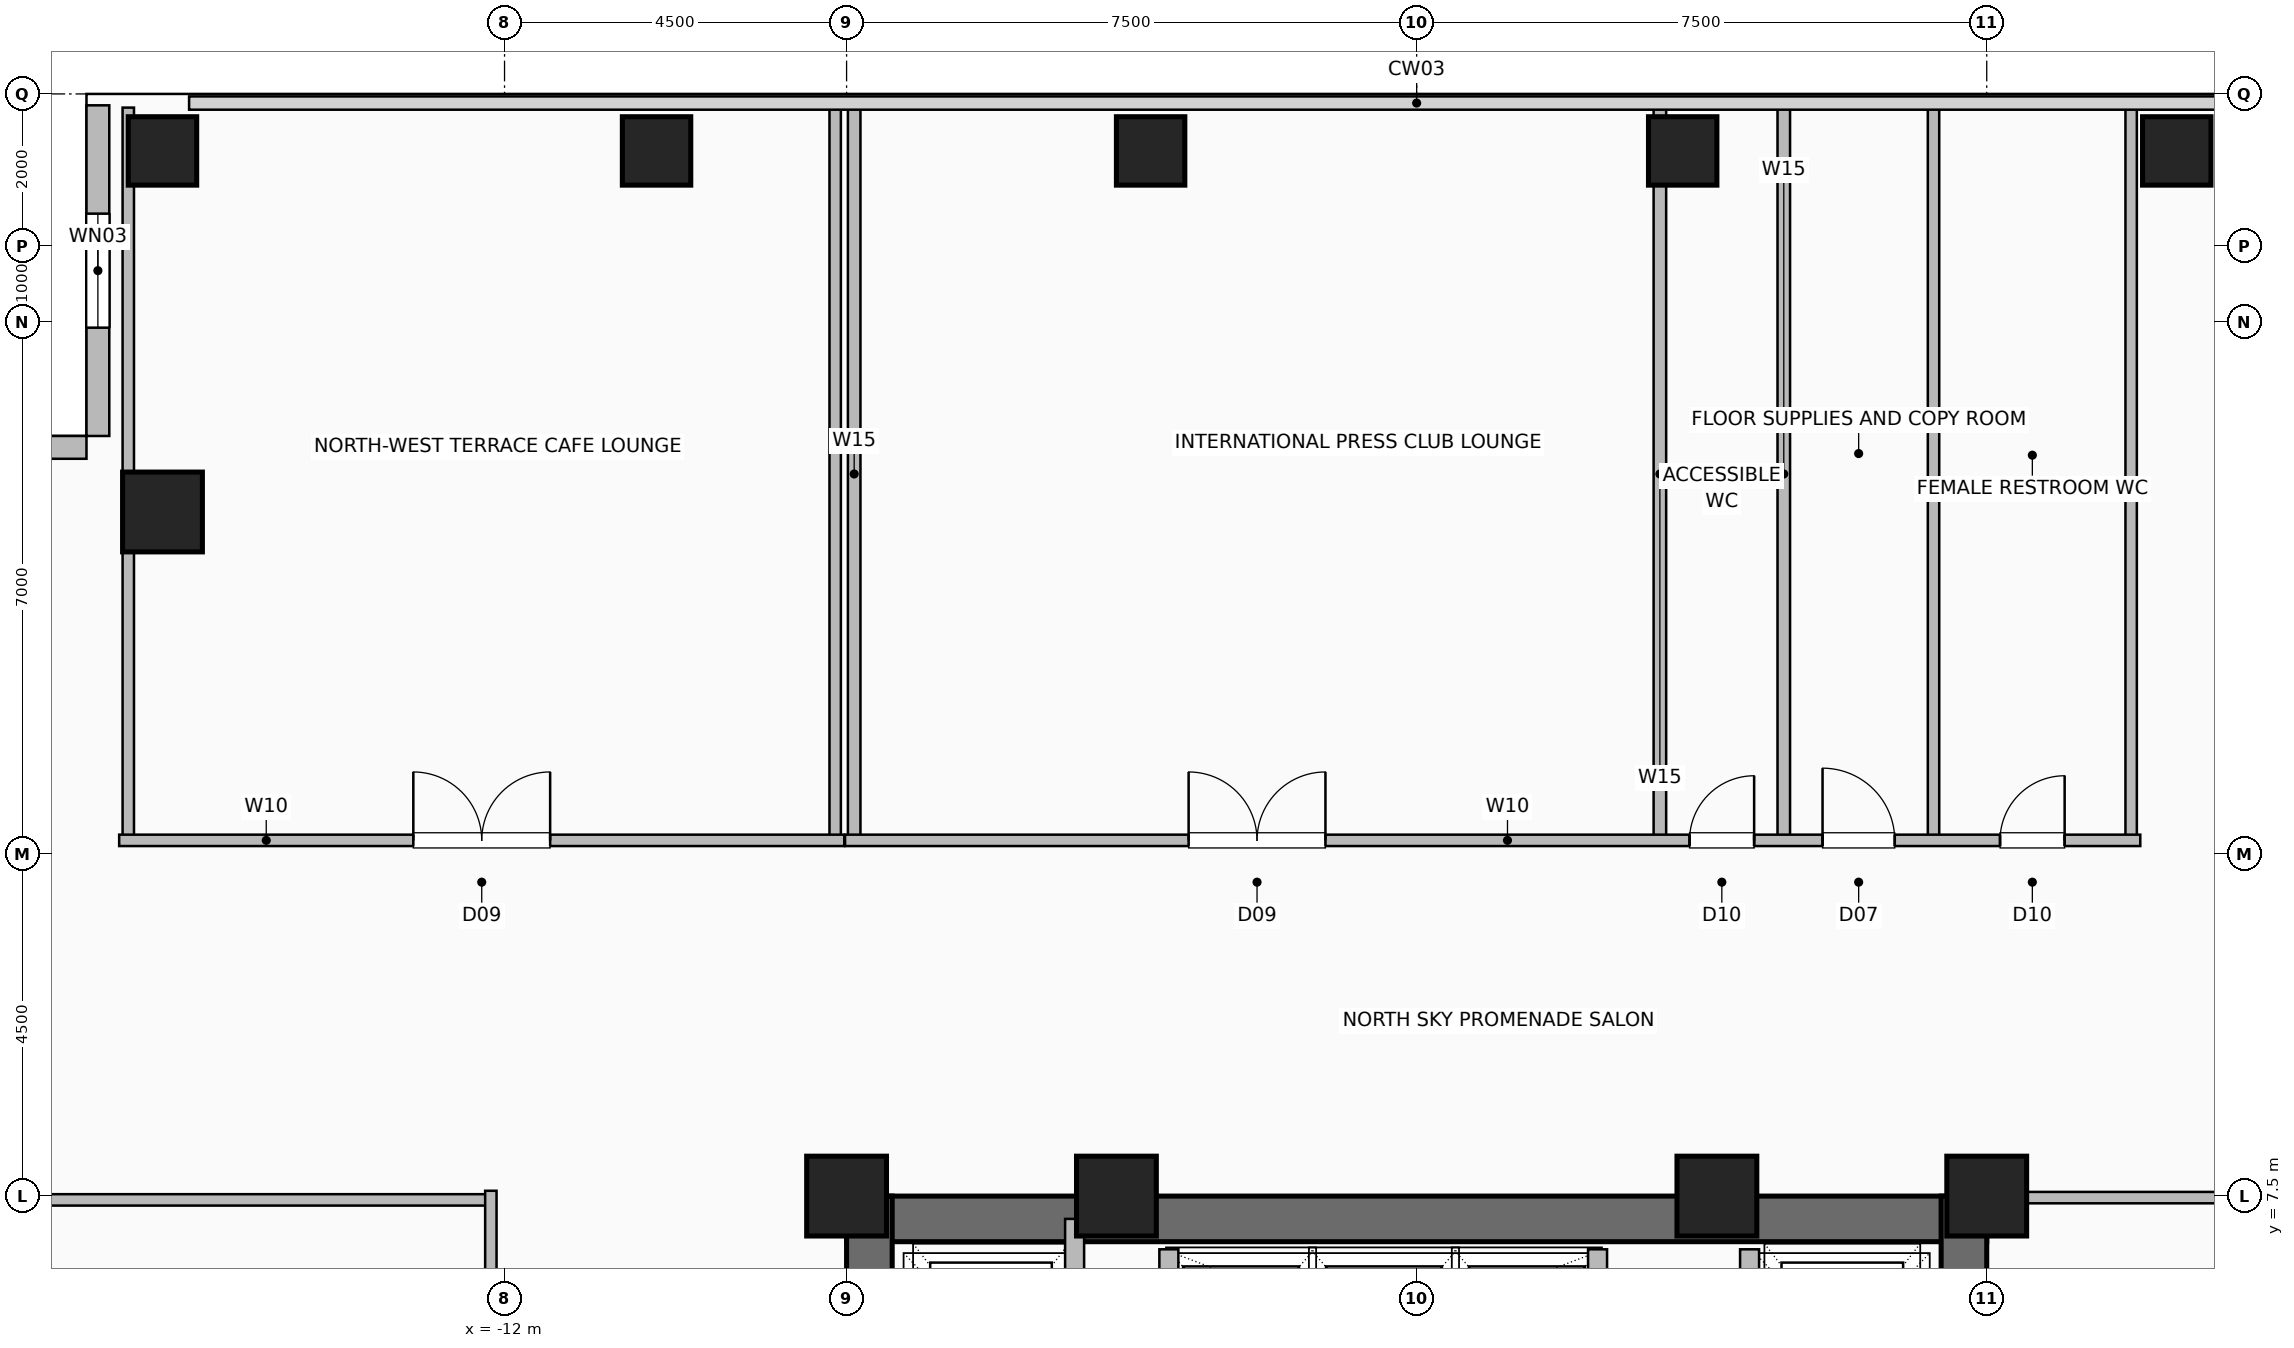
"""IFC4 building model, lengths in metres.
Left out: names, types, materials, properties, quantities, classifications, styles, units other than length and angle.
Written with IfcOpenShell. Run it as: python <this file> out.ifc"""

import sys

from ifc_helpers import new_model, si_unit, direction, frame, frame_2d, origin, origin_2d, place, context, subcontext, project, spatial, rectangle, hollow_rectangle, extrude, element, fill, save


model = new_model("IFC4")
c1 = context("Model", 3, precision=1e-05, world=origin(), true_north=direction((0.0, 1.0)))
c2 = subcontext(c1, "Body", "Model", "MODEL_VIEW")
j1 = project(units=[si_unit("LENGTHUNIT", "METRE"), si_unit("PLANEANGLEUNIT", "RADIAN")], contexts=[c1])
p1 = place(None, origin())
s1 = spatial("IfcSite", under=j1, at=p1, CompositionType="ELEMENT")
p2 = place(p1, origin())
s2 = spatial("IfcBuilding", under=s1, at=p2, CompositionType="ELEMENT")
p3 = place(p2, frame((0.0, 0.0, 119.2)))
s3 = spatial("IfcBuildingStorey", under=s2, at=p3, CompositionType="ELEMENT", Elevation=119.2)
for number, where, z_axis, x_axis in (
    (1, (7.5, 7.5, 0.0), (0.0, 0.0, 1.0), (1.0, 0.0, 0.0)),
    (2, (3.95, 7.5, 0.0), (0.0, 0.0, 1.0), (1.0, 0.0, 0.0)),
    (3, (-3.95, 7.5, 0.0), (0.0, 0.0, 1.0), (1.0, 0.0, 0.0)),
    (4, (-7.5, 7.5, 0.0), (0.0, 0.0, 1.0), (1.0, 0.0, 0.0)),
):
    element("IfcColumn", number, at=place(p3, frame(where, z_axis=z_axis, x_axis=x_axis)), inside=s3, PredefinedType="COLUMN", context=c2, shape_type="SweptSolid", body=[
        extrude(hollow_rectangle(XDim=1.05, YDim=1.05, WallThickness=0.05, at=origin_2d()), origin(), (0.0, 0.0, 1.0), 3.6),
    ])
for number, where, z_axis, x_axis in (
    (5, (-16.5, 21.25, 0.0), (0.0, 0.0, 1.0), (1.0, 0.0, 0.0)),
    (6, (-10.0, 21.25, 0.0), (0.0, 0.0, 1.0), (1.0, 0.0, 0.0)),
    (7, (-3.5, 21.25, 0.0), (0.0, 0.0, 1.0), (1.0, 0.0, 0.0)),
    (8, (3.5, 21.25, 0.0), (0.0, 0.0, 1.0), (1.0, 0.0, 0.0)),
    (9, (10.0, 21.25, 0.0), (0.0, 0.0, 1.0), (1.0, 0.0, 0.0)),
):
    element("IfcColumn", number, at=place(p3, frame(where, z_axis=z_axis, x_axis=x_axis)), inside=s3, PredefinedType="COLUMN", context=c2, shape_type="SweptSolid", body=[
        extrude(hollow_rectangle(XDim=0.9, YDim=0.9, WallThickness=0.045, at=origin_2d()), origin(), (0.0, 0.0, 1.0), 3.6),
    ])
p4 = place(p3, frame((-16.5, 16.5, 0.0), z_axis=(0.0, 0.0, 1.0), x_axis=(1.0, 0.0, 0.0)))
e10 = element("IfcColumn", 10, at=p4, inside=s3, PredefinedType="COLUMN", context=c2, shape_type="SweptSolid", body=[
    extrude(hollow_rectangle(XDim=1.05, YDim=1.05, WallThickness=0.05, at=origin_2d()), origin(), (0.0, 0.0, 1.0), 3.6),
])
p5 = place(p3, frame((-17.35, 21.85, 0.0), z_axis=(0.0, 0.0, 1.0), x_axis=(0.0, -1.0, 0.0)))
e11 = element("IfcWall", 11, at=p5, inside=s3, PredefinedType="SOLIDWALL", context=c2, shape_type="SweptSolid", body=[
    extrude(rectangle(XDim=4.35, YDim=0.3, at=frame_2d((2.175, 0.0))), origin(), (0.0, 0.0, 1.0), 3.36),
])
p6 = place(p5, frame((1.425, 0.0, 0.9)))
e12 = element("IfcOpeningElement", 12, at=p6, cuts=e11, PredefinedType="OPENING", context=c2, shape_type="SweptSolid", body=[
    extrude(rectangle(XDim=1.5, YDim=1.8, at=frame_2d((0.75, 0.9))), frame((0.0, 0.16, 0.0), z_axis=(0.0, -1.0, 0.0), x_axis=(1.0, 0.0, 0.0)), (0.0, 0.0, 1.0), 0.32),
])
p7 = place(p3, frame((-21.85, 17.35, 0.0), z_axis=(0.0, 0.0, 1.0), x_axis=(1.0, 0.0, 0.0)))
e13 = element("IfcWall", 13, at=p7, inside=s3, PredefinedType="SOLIDWALL", context=c2, shape_type="SweptSolid", body=[
    extrude(rectangle(XDim=4.35, YDim=0.3, at=frame_2d((2.175, 0.0))), origin(), (0.0, 0.0, 1.0), 3.36),
])
p8 = place(p3, frame((-7.5, 7.2, 0.0), z_axis=(0.0, 0.0, 1.0), x_axis=(1.0, 0.0, 0.0)))
e14 = element("IfcWall", 14, at=p8, inside=s3, PredefinedType="SHEAR", context=c2, shape_type="SweptSolid", body=[
    extrude(rectangle(XDim=15.0, YDim=0.6, at=frame_2d((7.5, 0.0))), origin(), (0.0, 0.0, 1.0), 3.36),
])
p9 = place(p3, frame((-7.2, -7.5, 0.0), z_axis=(0.0, 0.0, 1.0), x_axis=(0.0, 1.0, 0.0)))
e15 = element("IfcWall", 15, at=p9, inside=s3, PredefinedType="SHEAR", context=c2, shape_type="SweptSolid", body=[
    extrude(rectangle(XDim=15.0, YDim=0.6, at=frame_2d((7.5, 0.0))), origin(), (0.0, 0.0, 1.0), 3.36),
])
p10 = place(p9, frame((9.5, 0.0, 0.0)))
e16 = element("IfcOpeningElement", 16, at=p10, cuts=e15, PredefinedType="OPENING", context=c2, shape_type="SweptSolid", body=[
    extrude(rectangle(XDim=1.0, YDim=2.08, at=frame_2d((0.5, 1.04))), frame((0.0, 0.31, 0.0), z_axis=(0.0, -1.0, 0.0), x_axis=(1.0, 0.0, 0.0)), (0.0, 0.0, 1.0), 0.62),
])
p11 = place(p3, frame((7.2, -7.5, 0.0), z_axis=(0.0, 0.0, 1.0), x_axis=(0.0, 1.0, 0.0)))
e17 = element("IfcWall", 17, at=p11, inside=s3, PredefinedType="SHEAR", context=c2, shape_type="SweptSolid", body=[
    extrude(rectangle(XDim=15.0, YDim=0.6, at=frame_2d((7.5, 0.0))), origin(), (0.0, 0.0, 1.0), 3.36),
])
for number, where, z_axis, x_axis in (
    (18, (-3.26, 4.58, 0.0), (0.0, 0.0, 1.0), (0.0, 1.0, 0.0)),
    (19, (2.38, 4.58, 0.0), (0.0, 0.0, 1.0), (0.0, 1.0, 0.0)),
):
    element("IfcWall", number, at=place(p3, frame(where, z_axis=z_axis, x_axis=x_axis)), inside=s3, PredefinedType="SHEAR", context=c2, shape_type="SweptSolid", body=[
        extrude(rectangle(XDim=2.22, YDim=0.25, at=frame_2d((1.11, 0.0))), origin(), (0.0, 0.0, 1.0), 3.36),
    ])
p12 = place(p3, frame((-4.5, 4.35, 0.0), z_axis=(0.0, 0.0, 1.0), x_axis=(0.0, 1.0, 0.0)))
e20 = element("IfcWall", 20, at=p12, inside=s3, PredefinedType="SHEAR", context=c2, shape_type="SweptSolid", body=[
    extrude(rectangle(XDim=2.85, YDim=0.25, at=frame_2d((1.425, 0.0))), origin(), (0.0, 0.0, 1.0), 3.36),
])
p13 = place(p3, frame((4.38, 4.3, 0.0), z_axis=(0.0, 0.0, 1.0), x_axis=(0.0, 1.0, 0.0)))
e21 = element("IfcWall", 21, at=p13, inside=s3, PredefinedType="SHEAR", context=c2, shape_type="SweptSolid", body=[
    extrude(rectangle(XDim=2.5, YDim=0.25, at=frame_2d((1.25, 0.0))), origin(), (0.0, 0.0, 1.0), 3.36),
])
p14 = place(p13, frame((0.8, 0.0, 0.0)))
e22 = element("IfcOpeningElement", 22, at=p14, cuts=e21, PredefinedType="OPENING", context=c2, shape_type="SweptSolid", body=[
    extrude(rectangle(XDim=1.2, YDim=2.2, at=frame_2d((0.6, 1.1))), frame((0.0, 0.135, 0.0), z_axis=(0.0, -1.0, 0.0), x_axis=(1.0, 0.0, 0.0)), (0.0, 0.0, 1.0), 0.27),
])
p15 = place(p3, frame((-21.82, 7.45, 0.0), z_axis=(0.0, 0.0, 1.0), x_axis=(1.0, 0.0, 0.0)))
e23 = element("IfcWall", 23, at=p15, inside=s3, PredefinedType="PARTITIONING", context=c2, shape_type="SweptSolid", body=[
    extrude(rectangle(XDim=9.64, YDim=0.15, at=frame_2d((4.82, 0.0))), origin(), (0.0, 0.0, 1.0), 3.36),
])
p16 = place(p3, frame((-12.18, -7.57, 0.0), z_axis=(0.0, 0.0, 1.0), x_axis=(0.0, 1.0, 0.0)))
e24 = element("IfcWall", 24, at=p16, inside=s3, PredefinedType="PARTITIONING", context=c2, shape_type="SweptSolid", body=[
    extrude(rectangle(XDim=15.14, YDim=0.15, at=frame_2d((7.57, 0.0))), origin(), (0.0, 0.0, 1.0), 3.36),
])
p17 = place(p16, frame((3.695, 0.0, 0.0)))
e25 = element("IfcOpeningElement", 25, at=p17, cuts=e24, PredefinedType="OPENING", context=c2, shape_type="SweptSolid", body=[
    extrude(rectangle(XDim=1.8, YDim=2.08, at=frame_2d((0.9, 1.04))), frame((0.0, 0.085, 0.0), z_axis=(0.0, -1.0, 0.0), x_axis=(1.0, 0.0, 0.0)), (0.0, 0.0, 1.0), 0.17),
])
p18 = place(p16, frame((11.57, 0.0, 0.0)))
e26 = element("IfcOpeningElement", 26, at=p18, cuts=e24, PredefinedType="OPENING", context=c2, shape_type="SweptSolid", body=[
    extrude(rectangle(XDim=0.95, YDim=2.06, at=frame_2d((0.475, 1.03))), frame((0.0, 0.085, 0.0), z_axis=(0.0, -1.0, 0.0), x_axis=(1.0, 0.0, 0.0)), (0.0, 0.0, 1.0), 0.17),
])
for number, where, z_axis, x_axis in (
    (27, (-16.95, 12.18, 0.0), (0.0, 0.0, 1.0), (0.0, 1.0, 0.0)),
    (28, (-7.65, 12.18, 0.0), (0.0, 0.0, 1.0), (0.0, 1.0, 0.0)),
):
    element("IfcWall", number, at=place(p3, frame(where, z_axis=z_axis, x_axis=x_axis)), inside=s3, PredefinedType="PARTITIONING", context=c2, shape_type="SweptSolid", body=[
        extrude(rectangle(XDim=9.64, YDim=0.15, at=frame_2d((4.82, 0.0))), origin(), (0.0, 0.0, 1.0), 3.36),
    ])
p19 = place(p3, frame((-17.07, 12.18, 0.0), z_axis=(0.0, 0.0, 1.0), x_axis=(1.0, 0.0, 0.0)))
e29 = element("IfcWall", 29, at=p19, inside=s3, PredefinedType="PARTITIONING", context=c2, shape_type="SweptSolid", body=[
    extrude(rectangle(XDim=9.54, YDim=0.15, at=frame_2d((4.77, 0.0))), origin(), (0.0, 0.0, 1.0), 3.36),
])
p20 = place(p19, frame((3.87, 0.0, 0.0)))
e30 = element("IfcOpeningElement", 30, at=p20, cuts=e29, PredefinedType="OPENING", context=c2, shape_type="SweptSolid", body=[
    extrude(rectangle(XDim=1.8, YDim=2.08, at=frame_2d((0.9, 1.04))), frame((0.0, 0.085, 0.0), z_axis=(0.0, -1.0, 0.0), x_axis=(1.0, 0.0, 0.0)), (0.0, 0.0, 1.0), 0.17),
])
for number, where, z_axis, x_axis in (
    (31, (4.83, 12.18, 0.0), (0.0, 0.0, 1.0), (0.0, 1.0, 0.0)),
    (32, (-7.4, 12.18, 0.0), (0.0, 0.0, 1.0), (0.0, 1.0, 0.0)),
    (33, (3.2, 12.18, 0.0), (0.0, 0.0, 1.0), (0.0, 1.0, 0.0)),
):
    element("IfcWall", number, at=place(p3, frame(where, z_axis=z_axis, x_axis=x_axis)), inside=s3, PredefinedType="PLUMBINGWALL", context=c2, shape_type="SweptSolid", body=[
        extrude(rectangle(XDim=9.64, YDim=0.165, at=frame_2d((4.82, 0.0))), origin(), (0.0, 0.0, 1.0), 3.36),
    ])
for number, where, z_axis, x_axis in (
    (34, (6.8, 12.18, 0.0), (0.0, 0.0, 1.0), (0.0, 1.0, 0.0)),
    (35, (9.4, 12.18, 0.0), (0.0, 0.0, 1.0), (0.0, 1.0, 0.0)),
):
    element("IfcWall", number, at=place(p3, frame(where, z_axis=z_axis, x_axis=x_axis)), inside=s3, PredefinedType="PARTITIONING", context=c2, shape_type="SweptSolid", body=[
        extrude(rectangle(XDim=9.64, YDim=0.15, at=frame_2d((4.82, 0.0))), origin(), (0.0, 0.0, 1.0), 3.36),
    ])
p21 = place(p3, frame((-7.52, 12.18, 0.0), z_axis=(0.0, 0.0, 1.0), x_axis=(1.0, 0.0, 0.0)))
e36 = element("IfcWall", 36, at=p21, inside=s3, PredefinedType="PARTITIONING", context=c2, shape_type="SweptSolid", body=[
    extrude(rectangle(XDim=17.04, YDim=0.15, at=frame_2d((8.52, 0.0))), origin(), (0.0, 0.0, 1.0), 3.36),
])
p22 = place(p21, frame((4.52, 0.0, 0.0)))
e37 = element("IfcOpeningElement", 37, at=p22, cuts=e36, PredefinedType="OPENING", context=c2, shape_type="SweptSolid", body=[
    extrude(rectangle(XDim=1.8, YDim=2.08, at=frame_2d((0.9, 1.04))), frame((0.0, 0.085, 0.0), z_axis=(0.0, -1.0, 0.0), x_axis=(1.0, 0.0, 0.0)), (0.0, 0.0, 1.0), 0.17),
])
p23 = place(p21, frame((11.11, 0.0, 0.0)))
e38 = element("IfcOpeningElement", 38, at=p23, cuts=e36, PredefinedType="OPENING", context=c2, shape_type="SweptSolid", body=[
    extrude(rectangle(XDim=0.85, YDim=2.05, at=frame_2d((0.425, 1.025))), frame((0.0, 0.085, 0.0), z_axis=(0.0, -1.0, 0.0), x_axis=(1.0, 0.0, 0.0)), (0.0, 0.0, 1.0), 0.17),
])
p24 = place(p21, frame((12.86, 0.0, 0.0)))
e39 = element("IfcOpeningElement", 39, at=p24, cuts=e36, PredefinedType="OPENING", context=c2, shape_type="SweptSolid", body=[
    extrude(rectangle(XDim=0.95, YDim=2.06, at=frame_2d((0.475, 1.03))), frame((0.0, 0.085, 0.0), z_axis=(0.0, -1.0, 0.0), x_axis=(1.0, 0.0, 0.0)), (0.0, 0.0, 1.0), 0.17),
])
p25 = place(p21, frame((15.195, 0.0, 0.0)))
e40 = element("IfcOpeningElement", 40, at=p25, cuts=e36, PredefinedType="OPENING", context=c2, shape_type="SweptSolid", body=[
    extrude(rectangle(XDim=0.85, YDim=2.05, at=frame_2d((0.425, 1.025))), frame((0.0, 0.085, 0.0), z_axis=(0.0, -1.0, 0.0), x_axis=(1.0, 0.0, 0.0)), (0.0, 0.0, 1.0), 0.17),
])
p26 = place(p3, frame((7.6, 7.48, 0.0), z_axis=(0.0, 0.0, 1.0), x_axis=(1.0, 0.0, 0.0)))
e41 = element("IfcWall", 41, at=p26, inside=s3, PredefinedType="PARTITIONING", context=c2, shape_type="SweptSolid", body=[
    extrude(rectangle(XDim=14.22, YDim=0.15, at=frame_2d((7.11, 0.0))), origin(), (0.0, 0.0, 1.0), 3.36),
])
p27 = place(p6, origin())
e42 = element("IfcWindow", 42, at=p27, inside=s3, PartitioningType="SINGLE_PANEL", PredefinedType="WINDOW", context=c2, shape_type="SweptSolid", body=[
    extrude(rectangle(XDim=1.5, YDim=1.8, at=frame_2d((0.75, 0.9))), frame((0.0, 0.03, 0.0), z_axis=(0.0, -1.0, 0.0), x_axis=(1.0, 0.0, 0.0)), (0.0, 0.0, 1.0), 0.06),
])
fill(e12, e42)
p28 = place(p20, origin())
e43 = element("IfcDoor", 43, at=p28, inside=s3, OperationType="DOUBLE_DOOR_SINGLE_SWING", PredefinedType="DOOR", context=c2, shape_type="SweptSolid", body=[
    extrude(rectangle(XDim=1.8, YDim=2.08, at=frame_2d((0.9, 1.04))), frame((0.0, 0.025, 0.0), z_axis=(0.0, -1.0, 0.0), x_axis=(1.0, 0.0, 0.0)), (0.0, 0.0, 1.0), 0.05),
])
fill(e30, e43)
p29 = place(p22, origin())
e44 = element("IfcDoor", 44, at=p29, inside=s3, OperationType="DOUBLE_DOOR_SINGLE_SWING", PredefinedType="DOOR", context=c2, shape_type="SweptSolid", body=[
    extrude(rectangle(XDim=1.8, YDim=2.08, at=frame_2d((0.9, 1.04))), frame((0.0, 0.025, 0.0), z_axis=(0.0, -1.0, 0.0), x_axis=(1.0, 0.0, 0.0)), (0.0, 0.0, 1.0), 0.05),
])
fill(e37, e44)
p30 = place(p23, origin())
e45 = element("IfcDoor", 45, at=p30, inside=s3, OperationType="SINGLE_SWING_RIGHT", PredefinedType="DOOR", context=c2, shape_type="SweptSolid", body=[
    extrude(rectangle(XDim=0.85, YDim=2.05, at=frame_2d((0.425, 1.025))), frame((0.0, 0.025, 0.0), z_axis=(0.0, -1.0, 0.0), x_axis=(1.0, 0.0, 0.0)), (0.0, 0.0, 1.0), 0.05),
])
fill(e38, e45)
p31 = place(p24, origin())
e46 = element("IfcDoor", 46, at=p31, inside=s3, OperationType="SINGLE_SWING_LEFT", PredefinedType="DOOR", context=c2, shape_type="SweptSolid", body=[
    extrude(rectangle(XDim=0.95, YDim=2.06, at=frame_2d((0.475, 1.03))), frame((0.0, 0.025, 0.0), z_axis=(0.0, -1.0, 0.0), x_axis=(1.0, 0.0, 0.0)), (0.0, 0.0, 1.0), 0.05),
])
fill(e39, e46)
p32 = place(p25, origin())
e47 = element("IfcDoor", 47, at=p32, inside=s3, OperationType="SINGLE_SWING_RIGHT", PredefinedType="DOOR", context=c2, shape_type="SweptSolid", body=[
    extrude(rectangle(XDim=0.85, YDim=2.05, at=frame_2d((0.425, 1.025))), frame((0.0, 0.025, 0.0), z_axis=(0.0, -1.0, 0.0), x_axis=(1.0, 0.0, 0.0)), (0.0, 0.0, 1.0), 0.05),
])
fill(e40, e47)
save(model, sys.argv[1])
